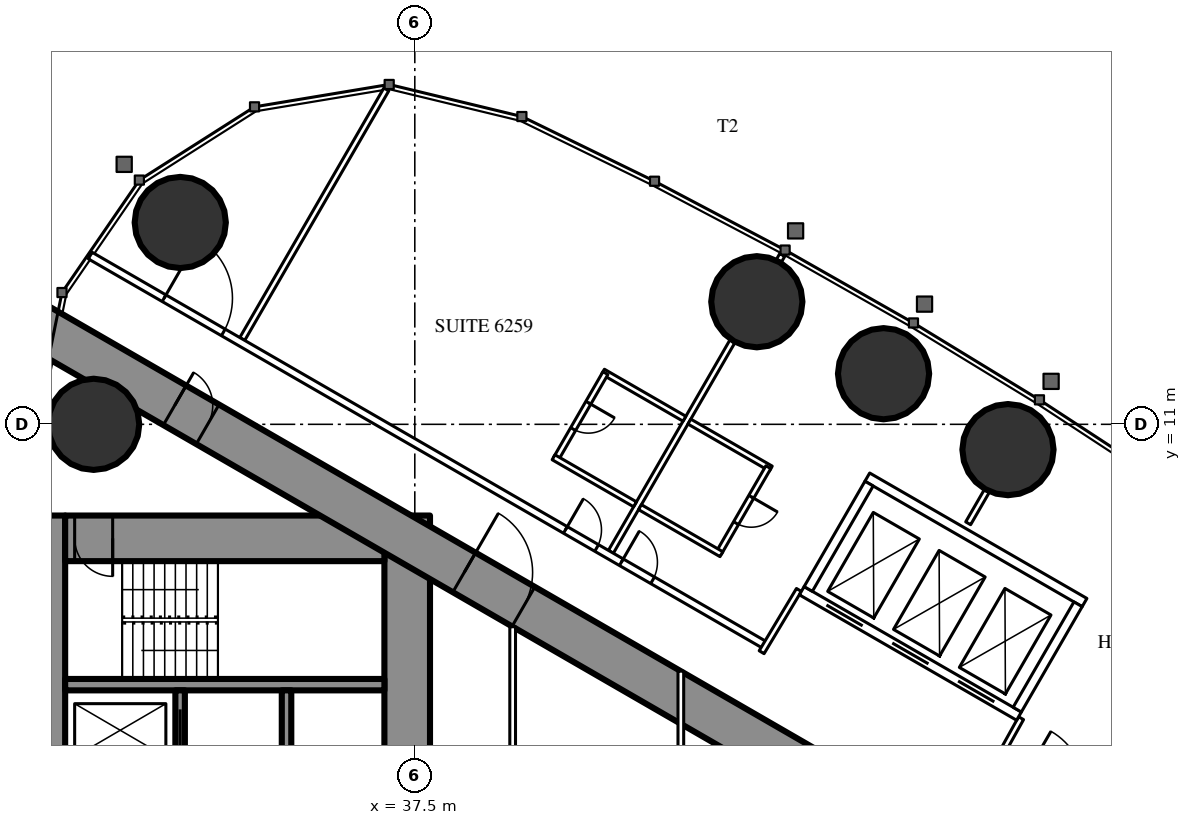
"""IFC4 building model, lengths in metres.
Left out: names, types, materials, properties, quantities, classifications, styles, units other than length and angle.
Written with IfcOpenShell. Run it as: python <this file> out.ifc"""

import sys

from ifc_helpers import new_model, si_unit, direction, frame, frame_2d, origin, origin_2d, place, context, subcontext, project, spatial, rectangle, circle, extrude, element, fill, save


model = new_model("IFC4")
c1 = context("Model", 3, precision=1e-05, world=origin(), true_north=direction((0.0, 1.0)))
c2 = subcontext(c1, "Body", "Model", "MODEL_VIEW")
j1 = project(units=[si_unit("LENGTHUNIT", "METRE"), si_unit("PLANEANGLEUNIT", "RADIAN")], contexts=[c1])
p1 = place(None, origin())
s1 = spatial("IfcSite", under=j1, at=p1, CompositionType="ELEMENT")
p2 = place(p1, origin())
s2 = spatial("IfcBuilding", under=s1, at=p2, CompositionType="ELEMENT")
p3 = place(p2, frame((0.0, 0.0, 233.3)))
s3 = spatial("IfcBuildingStorey", under=s2, at=p3, CompositionType="ELEMENT", Elevation=233.3)
for number, where, z_axis, x_axis in (
    (1, (31.328, 16.311, 0.0), (0.0, 0.0, 1.0), (1.0, 0.0, 0.0)),
    (2, (29.05, 11.0, 0.0), (0.0, 0.0, 1.0), (1.0, 0.0, 0.0)),
    (3, (53.108, 10.334, 0.0), (0.0, 0.0, 1.0), (1.0, 0.0, 0.0)),
    (4, (49.834, 12.332, 0.0), (0.0, 0.0, 1.0), (1.0, 0.0, 0.0)),
    (5, (46.499, 14.226, 0.0), (0.0, 0.0, 1.0), (1.0, 0.0, 0.0)),
):
    element("IfcColumn", number, at=place(p3, frame(where, z_axis=z_axis, x_axis=x_axis)), inside=s3, PredefinedType="COLUMN", context=c2, shape_type="SweptSolid", body=[
        extrude(circle(Radius=1.2, at=origin_2d()), origin(), (0.0, 0.0, 1.0), 3.6),
    ])
p4 = place(p3, frame((27.9, -8.6, 0.0), z_axis=(0.0, 0.0, 1.0), x_axis=(0.0, 1.0, 0.0)))
e6 = element("IfcWall", 6, at=p4, inside=s3, PredefinedType="SHEAR", context=c2, shape_type="SweptSolid", body=[
    extrude(rectangle(XDim=17.2, YDim=0.8, at=frame_2d((8.6, 0.0))), origin(), (0.0, 0.0, 1.0), 3.6),
])
p5 = place(p4, frame((9.35, 0.0, 0.0)))
e7 = element("IfcOpeningElement", 7, at=p5, cuts=e6, PredefinedType="OPENING", context=c2, shape_type="SweptSolid", body=[
    extrude(rectangle(XDim=0.9, YDim=2.2, at=frame_2d((0.45, 1.1))), frame((0.0, 0.41, 0.0), z_axis=(0.0, -1.0, 0.0), x_axis=(1.0, 0.0, 0.0)), (0.0, 0.0, 1.0), 0.82),
])
p6 = place(p3, frame((37.3, -8.6, 0.0), z_axis=(0.0, 0.0, 1.0), x_axis=(0.0, 1.0, 0.0)))
e8 = element("IfcWall", 8, at=p6, inside=s3, PredefinedType="SHEAR", context=c2, shape_type="SweptSolid", body=[
    extrude(rectangle(XDim=17.2, YDim=1.2, at=frame_2d((8.6, 0.0))), origin(), (0.0, 0.0, 1.0), 3.6),
])
p7 = place(p6, frame((7.7, 0.0, 0.0)))
e9 = element("IfcOpeningElement", 9, at=p7, cuts=e8, PredefinedType="OPENING", context=c2, shape_type="SweptSolid", body=[
    extrude(rectangle(XDim=1.8, YDim=2.2, at=frame_2d((0.9, 1.1))), frame((0.0, 0.61, 0.0), z_axis=(0.0, -1.0, 0.0), x_axis=(1.0, 0.0, 0.0)), (0.0, 0.0, 1.0), 1.22),
])
p8 = place(p3, frame((28.3, 8.0, 0.0), z_axis=(0.0, 0.0, 1.0), x_axis=(1.0, 0.0, 0.0)))
e10 = element("IfcWall", 10, at=p8, inside=s3, PredefinedType="SHEAR", context=c2, shape_type="SweptSolid", body=[
    extrude(rectangle(XDim=8.4, YDim=1.2, at=frame_2d((4.2, 0.0))), origin(), (0.0, 0.0, 1.0), 3.6),
])
p9 = place(p8, frame((0.25, 0.0, 0.0)))
e11 = element("IfcOpeningElement", 11, at=p9, cuts=e10, PredefinedType="OPENING", context=c2, shape_type="SweptSolid", body=[
    extrude(rectangle(XDim=1.0, YDim=2.2, at=frame_2d((0.5, 1.1))), frame((0.0, 0.61, 0.0), z_axis=(0.0, -1.0, 0.0), x_axis=(1.0, 0.0, 0.0)), (0.0, 0.0, 1.0), 1.22),
])
p10 = place(p3, frame((28.3, 4.15, 0.0), z_axis=(0.0, 0.0, 1.0), x_axis=(1.0, 0.0, 0.0)))
e12 = element("IfcWall", 12, at=p10, inside=s3, PredefinedType="SHEAR", context=c2, shape_type="SweptSolid", body=[
    extrude(rectangle(XDim=8.4, YDim=0.3, at=frame_2d((4.2, 0.0))), origin(), (0.0, 0.0, 1.0), 3.6),
])
p11 = place(p3, frame((31.325, 1.9, 0.0), z_axis=(0.0, 0.0, 1.0), x_axis=(0.0, 1.0, 0.0)))
e13 = element("IfcWall", 13, at=p11, inside=s3, PredefinedType="SHEAR", context=c2, shape_type="SweptSolid", body=[
    extrude(rectangle(XDim=2.1, YDim=0.25, at=frame_2d((1.05, 0.0))), origin(), (0.0, 0.0, 1.0), 3.6),
])
p12 = place(p11, frame((0.5, 0.0, 0.0)))
e14 = element("IfcOpeningElement", 14, at=p12, cuts=e13, PredefinedType="OPENING", context=c2, shape_type="SweptSolid", body=[
    extrude(rectangle(XDim=1.1, YDim=2.2, at=frame_2d((0.55, 1.1))), frame((0.0, 0.135, 0.0), z_axis=(0.0, -1.0, 0.0), x_axis=(1.0, 0.0, 0.0)), (0.0, 0.0, 1.0), 0.27),
])
p13 = place(p3, frame((34.125, 1.65, 0.0), z_axis=(0.0, 0.0, 1.0), x_axis=(0.0, 1.0, 0.0)))
e15 = element("IfcWall", 15, at=p13, inside=s3, PredefinedType="SHEAR", context=c2, shape_type="SweptSolid", body=[
    extrude(rectangle(XDim=2.35, YDim=0.25, at=frame_2d((1.175, 0.0))), origin(), (0.0, 0.0, 1.0), 3.6),
])
p14 = place(p3, frame((27.2, 13.8, 0.0), z_axis=(0.0, 0.0, 1.0), x_axis=(0.866024515034, -0.500001539357, 0.0)))
e16 = element("IfcWall", 16, at=p14, inside=s3, PredefinedType="SHEAR", context=c2, shape_type="SweptSolid", body=[
    extrude(rectangle(XDim=26.907, YDim=1.2, at=frame_2d((13.454, 0.0))), origin(), (0.0, 0.0, 1.0), 3.6),
])
p15 = place(p14, frame((4.6, 0.0, 0.0)))
e17 = element("IfcOpeningElement", 17, at=p15, cuts=e16, PredefinedType="OPENING", context=c2, shape_type="SweptSolid", body=[
    extrude(rectangle(XDim=1.0, YDim=2.2, at=frame_2d((0.5, 1.1))), frame((0.0, 0.61, 0.0), z_axis=(0.0, -1.0, 0.0), x_axis=(1.0, 0.0, 0.0)), (0.0, 0.0, 1.0), 1.22),
])
p16 = place(p14, frame((13.395, 0.0, 0.0)))
e18 = element("IfcOpeningElement", 18, at=p16, cuts=e16, PredefinedType="OPENING", context=c2, shape_type="SweptSolid", body=[
    extrude(rectangle(XDim=1.8, YDim=2.2, at=frame_2d((0.9, 1.1))), frame((0.0, 0.61, 0.0), z_axis=(0.0, -1.0, 0.0), x_axis=(1.0, 0.0, 0.0)), (0.0, 0.0, 1.0), 1.22),
])
p17 = place(p3, frame((32.96, 13.246, 0.0), z_axis=(0.0, 0.0, 1.0), x_axis=(0.500000236886, 0.866025267018, 0.0)))
e19 = element("IfcWall", 19, at=p17, inside=s3, PredefinedType="PARTITIONING", context=c2, shape_type="SweptSolid", body=[
    extrude(rectangle(XDim=7.583, YDim=0.15, at=frame_2d((3.791, 0.0))), origin(), (0.0, 0.0, 1.0), 3.35),
])
p18 = place(p3, frame((42.66, 7.646, 0.0), z_axis=(0.0, 0.0, 1.0), x_axis=(0.499996592859, 0.866027370889, 0.0)))
e20 = element("IfcWall", 20, at=p18, inside=s3, PredefinedType="PARTITIONING", context=c2, shape_type="SweptSolid", body=[
    extrude(rectangle(XDim=6.398, YDim=0.15, at=frame_2d((3.199, 0.0))), origin(), (0.0, 0.0, 1.0), 2.45),
])
p19 = place(p3, frame((47.079, 15.3, 0.0), z_axis=(0.0, 0.0, 1.0), x_axis=(0.499212083968, 0.866479829667, 0.0)))
e21 = element("IfcWall", 21, at=p19, inside=s3, PredefinedType="PARTITIONING", context=c2, shape_type="SweptSolid", body=[
    extrude(rectangle(XDim=0.179, YDim=0.15, at=frame_2d((0.09, 0.0))), origin(), (0.0, 0.0, 1.0), 2.45),
])
p20 = place(p3, frame((52.06, 8.396, 0.0), z_axis=(0.0, 0.0, 1.0), x_axis=(0.500095379624, 0.865970329329, 0.0)))
e22 = element("IfcWall", 22, at=p20, inside=s3, PredefinedType="PARTITIONING", context=c2, shape_type="SweptSolid", body=[
    extrude(rectangle(XDim=0.982, YDim=0.15, at=frame_2d((0.491, 0.0))), origin(), (0.0, 0.0, 1.0), 3.35),
])
p21 = place(p3, frame((28.959, 15.44, 0.0), z_axis=(0.0, 0.0, 1.0), x_axis=(0.866028936079, -0.499993881836, 0.0)))
e23 = element("IfcWall", 23, at=p21, inside=s3, PredefinedType="PARTITIONING", context=c2, shape_type="SweptSolid", body=[
    extrude(rectangle(XDim=20.503, YDim=0.2, at=frame_2d((10.251, 0.0))), origin(), (0.0, 0.0, 1.0), 3.35),
])
p22 = place(p21, frame((16.137, 0.0, 0.0)))
e24 = element("IfcOpeningElement", 24, at=p22, cuts=e23, PredefinedType="OPENING", context=c2, shape_type="SweptSolid", body=[
    extrude(rectangle(XDim=0.95, YDim=2.2, at=frame_2d((0.475, 1.1))), frame((0.0, 0.11, 0.0), z_axis=(0.0, -1.0, 0.0), x_axis=(1.0, 0.0, 0.0)), (0.0, 0.0, 1.0), 0.22),
])
p23 = place(p21, frame((14.437, 0.0, 0.0)))
e25 = element("IfcOpeningElement", 25, at=p23, cuts=e23, PredefinedType="OPENING", context=c2, shape_type="SweptSolid", body=[
    extrude(rectangle(XDim=0.95, YDim=2.2, at=frame_2d((0.475, 1.1))), frame((0.0, 0.11, 0.0), z_axis=(0.0, -1.0, 0.0), x_axis=(1.0, 0.0, 0.0)), (0.0, 0.0, 1.0), 0.22),
])
p24 = place(p21, frame((2.244, 0.0, 0.0)))
e26 = element("IfcOpeningElement", 26, at=p24, cuts=e23, PredefinedType="OPENING", context=c2, shape_type="SweptSolid", body=[
    extrude(rectangle(XDim=1.8, YDim=2.03, at=frame_2d((0.9, 1.015))), frame((0.0, 0.11, 0.0), z_axis=(0.0, -1.0, 0.0), x_axis=(1.0, 0.0, 0.0)), (0.0, 0.0, 1.0), 0.22),
])
p25 = place(p3, frame((47.606, 6.642, 0.0), z_axis=(0.0, 0.0, 1.0), x_axis=(-0.51353662755, -0.858067673418, 0.0)))
e27 = element("IfcWall", 27, at=p25, inside=s3, PredefinedType="PARTITIONING", context=c2, shape_type="SweptSolid", body=[
    extrude(rectangle(XDim=1.91, YDim=0.15, at=frame_2d((0.955, 0.0))), origin(), (0.0, 0.0, 1.0), 3.35),
])
p26 = place(p3, frame((52.576, 1.689, 0.0), z_axis=(0.0, 0.0, 1.0), x_axis=(0.485424724123, 0.874278466629, 0.0)))
e28 = element("IfcWall", 28, at=p26, inside=s3, PredefinedType="PARTITIONING", context=c2, shape_type="SweptSolid", body=[
    extrude(rectangle(XDim=1.805, YDim=0.15, at=frame_2d((0.903, 0.0))), origin(), (0.0, 0.0, 1.0), 3.35),
])
p27 = place(p3, frame((44.725, 11.072, 0.0), z_axis=(0.0, 0.0, 1.0), x_axis=(0.866006523861, -0.500032699561, 0.0)))
e29 = element("IfcWall", 29, at=p27, inside=s3, PredefinedType="PARTITIONING", context=c2, shape_type="SweptSolid", body=[
    extrude(rectangle(XDim=2.475, YDim=0.15, at=frame_2d((1.237, 0.0))), origin(), (0.0, 0.0, 1.0), 3.35),
])
p28 = place(p3, frame((45.503, 7.621, 0.0), z_axis=(0.0, 0.0, 1.0), x_axis=(0.500006934395, 0.866021400173, 0.0)))
e30 = element("IfcWall", 30, at=p28, inside=s3, PredefinedType="PARTITIONING", context=c2, shape_type="SweptSolid", body=[
    extrude(rectangle(XDim=2.6, YDim=0.15, at=frame_2d((1.3, 0.0))), origin(), (0.0, 0.0, 1.0), 3.35),
])
p29 = place(p28, frame((0.9, 0.0, 0.0)))
e31 = element("IfcOpeningElement", 31, at=p29, cuts=e30, PredefinedType="OPENING", context=c2, shape_type="SweptSolid", body=[
    extrude(rectangle(XDim=0.8, YDim=2.2, at=frame_2d((0.4, 1.1))), frame((0.0, 0.085, 0.0), z_axis=(0.0, -1.0, 0.0), x_axis=(1.0, 0.0, 0.0)), (0.0, 0.0, 1.0), 0.17),
])
p30 = place(p3, frame((43.425, 8.821, 0.0), z_axis=(0.0, 0.0, 1.0), x_axis=(0.866006523861, -0.500032699561, 0.0)))
e32 = element("IfcWall", 32, at=p30, inside=s3, PredefinedType="PARTITIONING", context=c2, shape_type="SweptSolid", body=[
    extrude(rectangle(XDim=2.475, YDim=0.15, at=frame_2d((1.237, 0.0))), origin(), (0.0, 0.0, 1.0), 2.5),
])
p31 = place(p3, frame((42.451, 12.385, 0.0), z_axis=(0.0, 0.0, 1.0), x_axis=(0.866031185235, -0.4999899861, 0.0)))
e33 = element("IfcWall", 33, at=p31, inside=s3, PredefinedType="PARTITIONING", context=c2, shape_type="SweptSolid", body=[
    extrude(rectangle(XDim=2.475, YDim=0.15, at=frame_2d((1.238, 0.0))), origin(), (0.0, 0.0, 1.0), 3.35),
])
p32 = place(p3, frame((41.216, 10.095, 0.0), z_axis=(0.0, 0.0, 1.0), x_axis=(0.499936506574, 0.866062058628, 0.0)))
e34 = element("IfcWall", 34, at=p32, inside=s3, PredefinedType="PARTITIONING", context=c2, shape_type="SweptSolid", body=[
    extrude(rectangle(XDim=2.6, YDim=0.15, at=frame_2d((1.3, 0.0))), origin(), (0.0, 0.0, 1.0), 3.35),
])
p33 = place(p32, frame((0.9, 0.0, 0.0)))
e35 = element("IfcOpeningElement", 35, at=p33, cuts=e34, PredefinedType="OPENING", context=c2, shape_type="SweptSolid", body=[
    extrude(rectangle(XDim=0.8, YDim=2.2, at=frame_2d((0.4, 1.1))), frame((0.0, 0.085, 0.0), z_axis=(0.0, -1.0, 0.0), x_axis=(1.0, 0.0, 0.0)), (0.0, 0.0, 1.0), 0.17),
])
p34 = place(p3, frame((41.151, 10.133, 0.0), z_axis=(0.0, 0.0, 1.0), x_axis=(0.866006523861, -0.500032699561, 0.0)))
e36 = element("IfcWall", 36, at=p34, inside=s3, PredefinedType="PARTITIONING", context=c2, shape_type="SweptSolid", body=[
    extrude(rectangle(XDim=2.475, YDim=0.15, at=frame_2d((1.237, 0.0))), origin(), (0.0, 0.0, 1.0), 2.5),
])
p35 = place(p3, frame((40.075, -5.674, 0.0), z_axis=(0.0, 0.0, 1.0), x_axis=(0.0, 1.0, 0.0)))
e37 = element("IfcWall", 37, at=p35, inside=s3, PredefinedType="PARTITIONING", context=c2, shape_type="SweptSolid", body=[
    extrude(rectangle(XDim=11.348, YDim=0.15, at=frame_2d((5.674, 0.0))), origin(), (0.0, 0.0, 1.0), 3.35),
])
p36 = place(p35, frame((4.774, 0.0, 0.0)))
e38 = element("IfcOpeningElement", 38, at=p36, cuts=e37, PredefinedType="OPENING", context=c2, shape_type="SweptSolid", body=[
    extrude(rectangle(XDim=1.8, YDim=2.2, at=frame_2d((0.9, 1.1))), frame((0.0, 0.085, 0.0), z_axis=(0.0, -1.0, 0.0), x_axis=(1.0, 0.0, 0.0)), (0.0, 0.0, 1.0), 0.17),
])
p37 = place(p3, frame((44.5, -4.505, 0.0), z_axis=(0.0, 0.0, 1.0), x_axis=(0.0, 1.0, 0.0)))
e39 = element("IfcWall", 39, at=p37, inside=s3, PredefinedType="PARTITIONING", context=c2, shape_type="SweptSolid", body=[
    extrude(rectangle(XDim=9.009, YDim=0.15, at=frame_2d((4.505, 0.0))), origin(), (0.0, 0.0, 1.0), 3.35),
])
p38 = place(p37, frame((4.005, 0.0, 0.0)))
e40 = element("IfcOpeningElement", 40, at=p38, cuts=e39, PredefinedType="OPENING", context=c2, shape_type="SweptSolid", body=[
    extrude(rectangle(XDim=1.0, YDim=2.2, at=frame_2d((0.5, 1.1))), frame((0.0, 0.085, 0.0), z_axis=(0.0, -1.0, 0.0), x_axis=(1.0, 0.0, 0.0)), (0.0, 0.0, 1.0), 0.17),
])
p39 = place(p3, frame((47.681, 6.622, 0.0), z_axis=(0.0, 0.0, 1.0), x_axis=(0.86603344179, -0.499986077507, 0.0)))
e41 = element("IfcWall", 41, at=p39, inside=s3, PredefinedType="PARTITIONING", context=c2, shape_type="SweptSolid", body=[
    extrude(rectangle(XDim=6.6, YDim=0.25, at=frame_2d((3.3, 0.0))), origin(), (0.0, 0.0, 1.0), 3.35),
])
p40 = place(p39, frame((0.75, 0.0, 0.0)))
e42 = element("IfcOpeningElement", 42, at=p40, cuts=e41, PredefinedType="OPENING", context=c2, shape_type="SweptSolid", body=[
    extrude(rectangle(XDim=1.1, YDim=2.2, at=frame_2d((0.55, 1.1))), frame((0.0, 0.135, 0.0), z_axis=(0.0, -1.0, 0.0), x_axis=(1.0, 0.0, 0.0)), (0.0, 0.0, 1.0), 0.27),
])
p41 = place(p39, frame((2.75, 0.0, 0.0)))
e43 = element("IfcOpeningElement", 43, at=p41, cuts=e41, PredefinedType="OPENING", context=c2, shape_type="SweptSolid", body=[
    extrude(rectangle(XDim=1.1, YDim=2.2, at=frame_2d((0.55, 1.1))), frame((0.0, 0.135, 0.0), z_axis=(0.0, -1.0, 0.0), x_axis=(1.0, 0.0, 0.0)), (0.0, 0.0, 1.0), 0.27),
])
p42 = place(p39, frame((4.75, 0.0, 0.0)))
e44 = element("IfcOpeningElement", 44, at=p42, cuts=e41, PredefinedType="OPENING", context=c2, shape_type="SweptSolid", body=[
    extrude(rectangle(XDim=1.1, YDim=2.2, at=frame_2d((0.55, 1.1))), frame((0.0, 0.135, 0.0), z_axis=(0.0, -1.0, 0.0), x_axis=(1.0, 0.0, 0.0)), (0.0, 0.0, 1.0), 0.27),
])
p43 = place(p3, frame((49.406, 9.611, 0.0), z_axis=(0.0, 0.0, 1.0), x_axis=(0.86603344179, -0.499986077507, 0.0)))
e45 = element("IfcWall", 45, at=p43, inside=s3, PredefinedType="PARTITIONING", context=c2, shape_type="SweptSolid", body=[
    extrude(rectangle(XDim=6.6, YDim=0.25, at=frame_2d((3.3, 0.0))), origin(), (0.0, 0.0, 1.0), 3.35),
])
p44 = place(p3, frame((47.852, 6.668, 0.0), z_axis=(0.0, 0.0, 1.0), x_axis=(0.499929347863, 0.866066190972, 0.0)))
e46 = element("IfcWall", 46, at=p44, inside=s3, PredefinedType="PARTITIONING", context=c2, shape_type="SweptSolid", body=[
    extrude(rectangle(XDim=3.201, YDim=0.25, at=frame_2d((1.6, 0.0))), origin(), (0.0, 0.0, 1.0), 3.35),
])
p45 = place(p3, frame((53.352, 3.493, 0.0), z_axis=(0.0, 0.0, 1.0), x_axis=(0.499872130319, 0.866099216793, 0.0)))
e47 = element("IfcWall", 47, at=p45, inside=s3, PredefinedType="PARTITIONING", context=c2, shape_type="SweptSolid", body=[
    extrude(rectangle(XDim=3.2, YDim=0.25, at=frame_2d((1.6, 0.0))), origin(), (0.0, 0.0, 1.0), 3.35),
])
p46 = place(p29, origin())
e48 = element("IfcDoor", 48, at=p46, inside=s3, OperationType="SINGLE_SWING_RIGHT", PredefinedType="DOOR", context=c2, shape_type="SweptSolid", body=[
    extrude(rectangle(XDim=0.8, YDim=2.2, at=frame_2d((0.4, 1.1))), frame((0.0, 0.025, 0.0), z_axis=(0.0, -1.0, 0.0), x_axis=(1.0, 0.0, 0.0)), (0.0, 0.0, 1.0), 0.05),
])
fill(e31, e48)
p47 = place(p22, origin())
e49 = element("IfcDoor", 49, at=p47, inside=s3, OperationType="SINGLE_SWING_LEFT", PredefinedType="DOOR", context=c2, shape_type="SweptSolid", body=[
    extrude(rectangle(XDim=0.95, YDim=2.2, at=frame_2d((0.475, 1.1))), frame((0.0, 0.025, 0.0), z_axis=(0.0, -1.0, 0.0), x_axis=(1.0, 0.0, 0.0)), (0.0, 0.0, 1.0), 0.05),
])
fill(e24, e49)
p48 = place(p33, origin())
e50 = element("IfcDoor", 50, at=p48, inside=s3, OperationType="SINGLE_SWING_RIGHT", PredefinedType="DOOR", context=c2, shape_type="SweptSolid", body=[
    extrude(rectangle(XDim=0.8, YDim=2.2, at=frame_2d((0.4, 1.1))), frame((0.0, 0.025, 0.0), z_axis=(0.0, -1.0, 0.0), x_axis=(1.0, 0.0, 0.0)), (0.0, 0.0, 1.0), 0.05),
])
fill(e35, e50)
p49 = place(p23, origin())
e51 = element("IfcDoor", 51, at=p49, inside=s3, OperationType="SINGLE_SWING_LEFT", PredefinedType="DOOR", context=c2, shape_type="SweptSolid", body=[
    extrude(rectangle(XDim=0.95, YDim=2.2, at=frame_2d((0.475, 1.1))), frame((0.0, 0.025, 0.0), z_axis=(0.0, -1.0, 0.0), x_axis=(1.0, 0.0, 0.0)), (0.0, 0.0, 1.0), 0.05),
])
fill(e25, e51)
p50 = place(p24, origin())
e52 = element("IfcDoor", 52, at=p50, inside=s3, OperationType="DOUBLE_DOOR_SINGLE_SWING", PredefinedType="DOOR", context=c2, shape_type="SweptSolid", body=[
    extrude(rectangle(XDim=1.8, YDim=2.03, at=frame_2d((0.9, 1.015))), frame((0.0, 0.025, 0.0), z_axis=(0.0, -1.0, 0.0), x_axis=(1.0, 0.0, 0.0)), (0.0, 0.0, 1.0), 0.05),
])
fill(e26, e52)
p51 = place(p15, origin())
e53 = element("IfcDoor", 53, at=p51, inside=s3, OperationType="SINGLE_SWING_LEFT", PredefinedType="DOOR", context=c2, shape_type="SweptSolid", body=[
    extrude(rectangle(XDim=1.0, YDim=2.2, at=frame_2d((0.5, 1.1))), frame((0.0, 0.025, 0.0), z_axis=(0.0, -1.0, 0.0), x_axis=(1.0, 0.0, 0.0)), (0.0, 0.0, 1.0), 0.05),
])
fill(e17, e53)
p52 = place(p16, origin())
e54 = element("IfcDoor", 54, at=p52, inside=s3, OperationType="DOUBLE_DOOR_SINGLE_SWING", PredefinedType="DOOR", context=c2, shape_type="SweptSolid", body=[
    extrude(rectangle(XDim=1.8, YDim=2.2, at=frame_2d((0.9, 1.1))), frame((0.0, 0.025, 0.0), z_axis=(0.0, -1.0, 0.0), x_axis=(1.0, 0.0, 0.0)), (0.0, 0.0, 1.0), 0.05),
])
fill(e18, e54)
p53 = place(p9, origin())
e55 = element("IfcDoor", 55, at=p53, inside=s3, OperationType="SINGLE_SWING_RIGHT", PredefinedType="DOOR", context=c2, shape_type="SweptSolid", body=[
    extrude(rectangle(XDim=1.0, YDim=2.2, at=frame_2d((0.5, 1.1))), frame((0.0, 0.025, 0.0), z_axis=(0.0, -1.0, 0.0), x_axis=(1.0, 0.0, 0.0)), (0.0, 0.0, 1.0), 0.05),
])
fill(e11, e55)
p54 = place(p12, origin())
e56 = element("IfcDoor", 56, at=p54, inside=s3, OperationType="SLIDING_TO_LEFT", PredefinedType="USERDEFINED", context=c2, shape_type="SweptSolid", body=[
    extrude(rectangle(XDim=1.1, YDim=2.2, at=frame_2d((0.55, 1.1))), frame((0.0, 0.025, 0.0), z_axis=(0.0, -1.0, 0.0), x_axis=(1.0, 0.0, 0.0)), (0.0, 0.0, 1.0), 0.05),
])
fill(e14, e56)
p55 = place(p40, origin())
e57 = element("IfcDoor", 57, at=p55, inside=s3, OperationType="DOUBLE_DOOR_SLIDING", PredefinedType="USERDEFINED", context=c2, shape_type="SweptSolid", body=[
    extrude(rectangle(XDim=1.1, YDim=2.2, at=frame_2d((0.55, 1.1))), frame((0.0, 0.025, 0.0), z_axis=(0.0, -1.0, 0.0), x_axis=(1.0, 0.0, 0.0)), (0.0, 0.0, 1.0), 0.05),
])
fill(e42, e57)
p56 = place(p41, origin())
e58 = element("IfcDoor", 58, at=p56, inside=s3, OperationType="DOUBLE_DOOR_SLIDING", PredefinedType="USERDEFINED", context=c2, shape_type="SweptSolid", body=[
    extrude(rectangle(XDim=1.1, YDim=2.2, at=frame_2d((0.55, 1.1))), frame((0.0, 0.025, 0.0), z_axis=(0.0, -1.0, 0.0), x_axis=(1.0, 0.0, 0.0)), (0.0, 0.0, 1.0), 0.05),
])
fill(e43, e58)
p57 = place(p42, origin())
e59 = element("IfcDoor", 59, at=p57, inside=s3, OperationType="DOUBLE_DOOR_SLIDING", PredefinedType="USERDEFINED", context=c2, shape_type="SweptSolid", body=[
    extrude(rectangle(XDim=1.1, YDim=2.2, at=frame_2d((0.55, 1.1))), frame((0.0, 0.025, 0.0), z_axis=(0.0, -1.0, 0.0), x_axis=(1.0, 0.0, 0.0)), (0.0, 0.0, 1.0), 0.05),
])
fill(e44, e59)
save(model, sys.argv[1])
